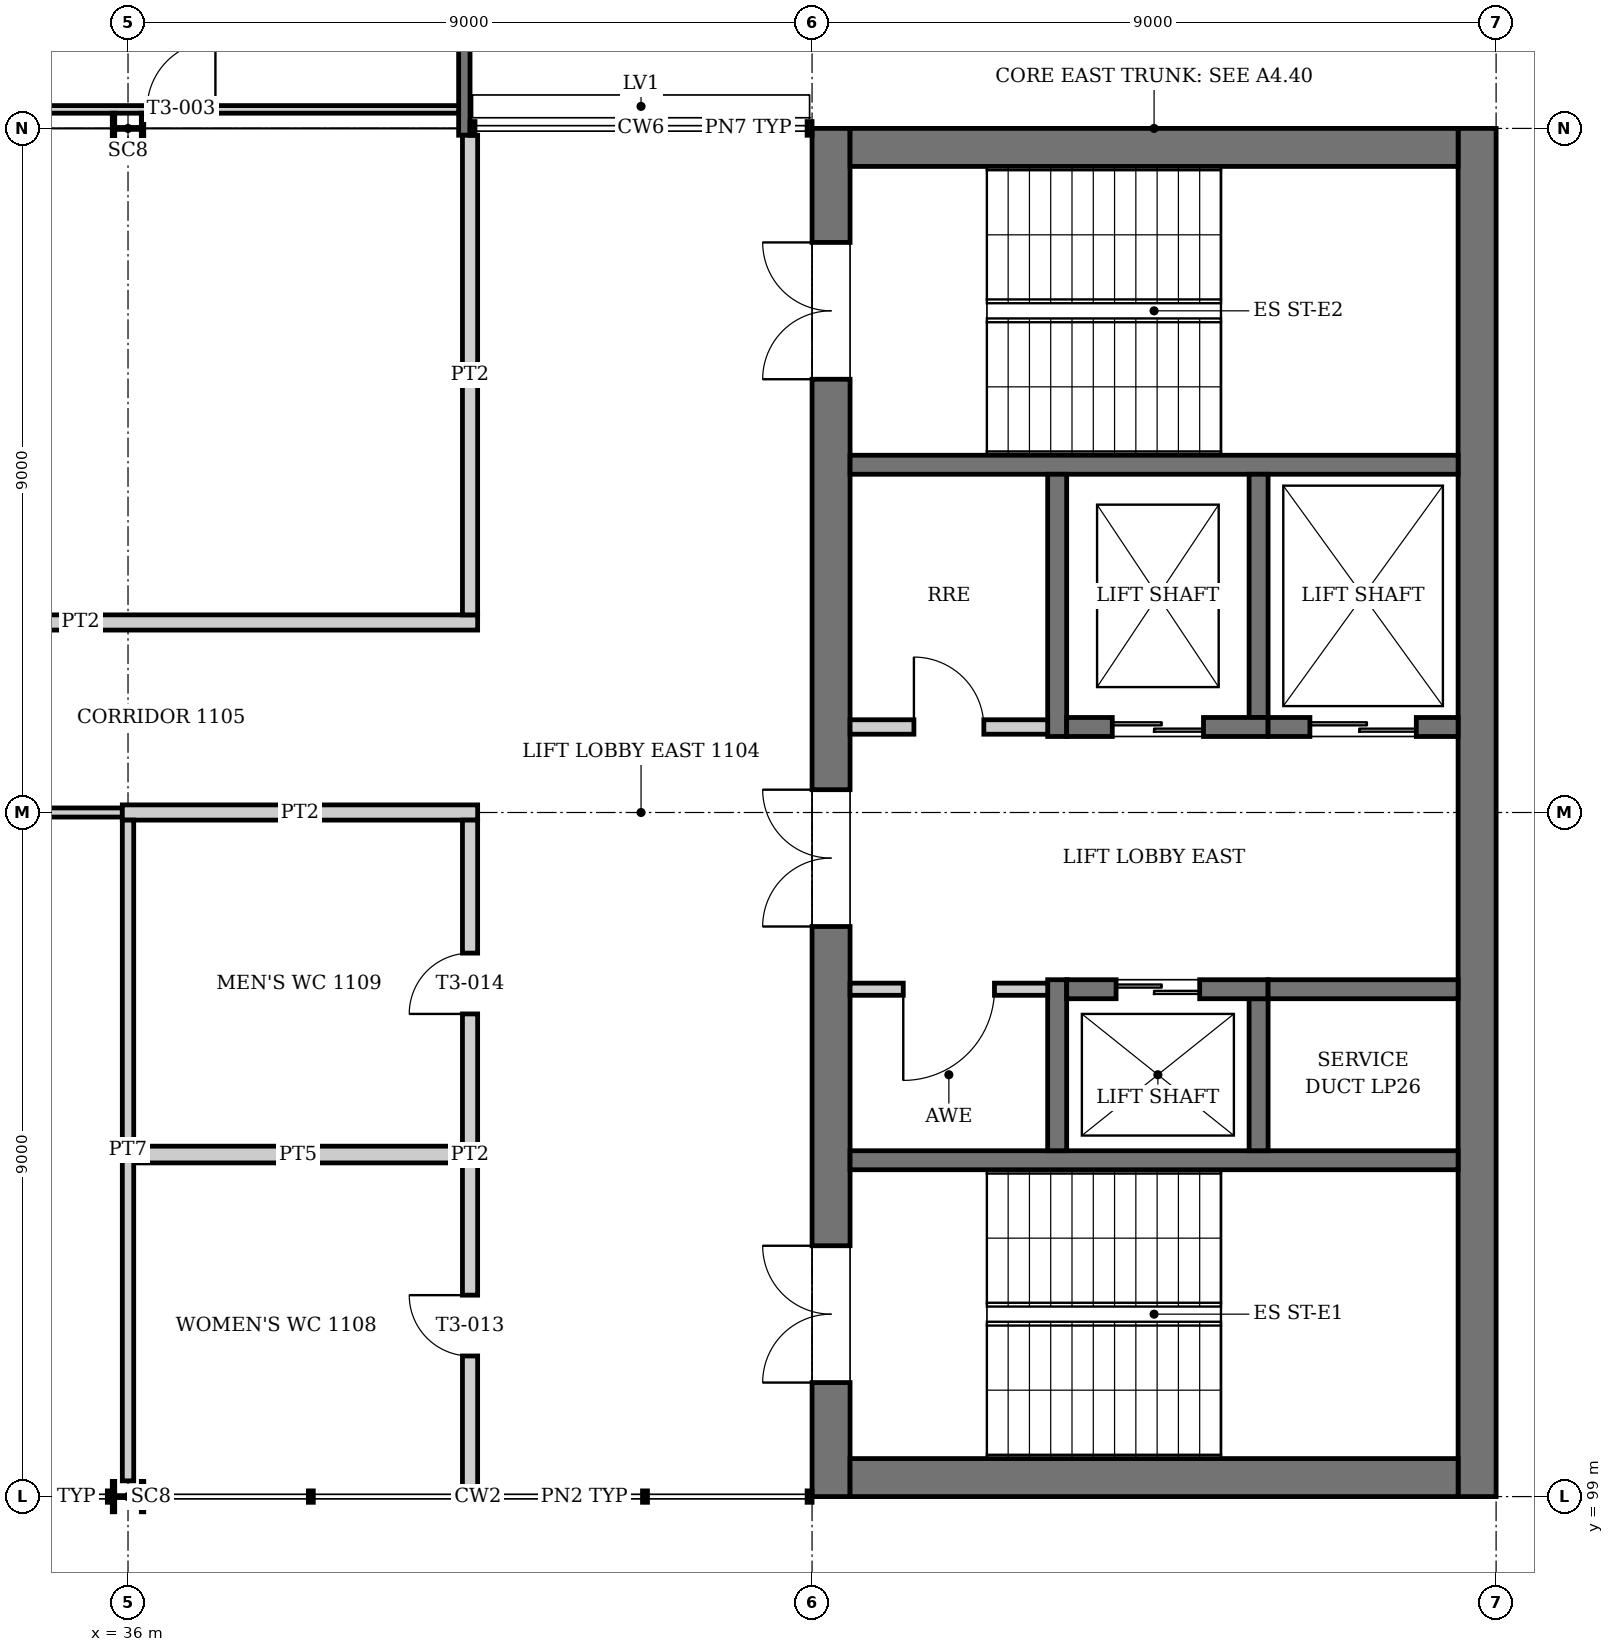
"""IFC4 building model, lengths in metres.
Left out: names, types, materials, properties, quantities, classifications, styles, units other than length and angle.
Written with IfcOpenShell. Run it as: python <this file> out.ifc"""

import sys

from ifc_helpers import new_model, si_unit, direction, frame, frame_2d, origin, origin_2d, place, context, subcontext, project, spatial, rectangle, i_section, extrude, element, fill, save


model = new_model("IFC4")
c1 = context("Model", 3, precision=1e-05, world=origin(), true_north=direction((0.0, 1.0)))
c2 = subcontext(c1, "Body", "Model", "MODEL_VIEW")
j1 = project(units=[si_unit("LENGTHUNIT", "METRE"), si_unit("PLANEANGLEUNIT", "RADIAN")], contexts=[c1])
p1 = place(None, origin())
s1 = spatial("IfcSite", under=j1, at=p1, CompositionType="ELEMENT")
p2 = place(p1, origin())
s2 = spatial("IfcBuilding", under=s1, at=p2, CompositionType="ELEMENT")
p3 = place(p2, frame((0.0, 0.0, 47.2)))
s3 = spatial("IfcBuildingStorey", under=s2, at=p3, CompositionType="ELEMENT", Elevation=47.2)
for number, where, z_axis, x_axis in (
    (1, (36.0, 99.0, 0.0), (0.0, 0.0, 1.0), (0.0, 1.0, 0.0)),
    (2, (36.0, 117.0, 0.0), (0.0, 0.0, 1.0), (0.0, 1.0, 0.0)),
):
    element("IfcColumn", number, at=place(p3, frame(where, z_axis=z_axis, x_axis=x_axis)), inside=s3, PredefinedType="COLUMN", context=c2, shape_type="SweptSolid", body=[
        extrude(i_section(OverallWidth=0.4, OverallDepth=0.414, WebThickness=0.025, FlangeThickness=0.032, at=origin_2d()), origin(), (0.0, 0.0, 1.0), 4.0),
    ])
p4 = place(p3, frame((45.25, 99.0, 0.0), z_axis=(0.0, 0.0, 1.0), x_axis=(0.0, 1.0, 0.0)))
e3 = element("IfcWall", 3, at=p4, inside=s3, PredefinedType="SHEAR", context=c2, shape_type="SweptSolid", body=[
    extrude(rectangle(XDim=18.0, YDim=0.5, at=frame_2d((9.0, 0.0))), origin(), (0.0, 0.0, 1.0), 4.0),
])
p5 = place(p4, frame((1.5, 0.0, 0.0)))
e4 = element("IfcOpeningElement", 4, at=p5, cuts=e3, PredefinedType="OPENING", context=c2, shape_type="SweptSolid", body=[
    extrude(rectangle(XDim=1.8, YDim=2.1, at=frame_2d((0.9, 1.05))), frame((0.0, 0.26, 0.0), z_axis=(0.0, -1.0, 0.0), x_axis=(1.0, 0.0, 0.0)), (0.0, 0.0, 1.0), 0.52),
])
p6 = place(p4, frame((14.7, 0.0, 0.0)))
e5 = element("IfcOpeningElement", 5, at=p6, cuts=e3, PredefinedType="OPENING", context=c2, shape_type="SweptSolid", body=[
    extrude(rectangle(XDim=1.8, YDim=2.1, at=frame_2d((0.9, 1.05))), frame((0.0, 0.26, 0.0), z_axis=(0.0, -1.0, 0.0), x_axis=(1.0, 0.0, 0.0)), (0.0, 0.0, 1.0), 0.52),
])
p7 = place(p4, frame((7.5, 0.0, 0.0)))
e6 = element("IfcOpeningElement", 6, at=p7, cuts=e3, PredefinedType="OPENING", context=c2, shape_type="SweptSolid", body=[
    extrude(rectangle(XDim=1.8, YDim=2.1, at=frame_2d((0.9, 1.05))), frame((0.0, 0.26, 0.0), z_axis=(0.0, -1.0, 0.0), x_axis=(1.0, 0.0, 0.0)), (0.0, 0.0, 1.0), 0.52),
])
p8 = place(p3, frame((53.75, 99.0, 0.0), z_axis=(0.0, 0.0, 1.0), x_axis=(0.0, 1.0, 0.0)))
e7 = element("IfcWall", 7, at=p8, inside=s3, PredefinedType="SHEAR", context=c2, shape_type="SweptSolid", body=[
    extrude(rectangle(XDim=18.0, YDim=0.5, at=frame_2d((9.0, 0.0))), origin(), (0.0, 0.0, 1.0), 4.0),
])
for number, where, z_axis, x_axis in (
    (8, (45.5, 99.25, 0.0), (0.0, 0.0, 1.0), (1.0, 0.0, 0.0)),
    (9, (45.5, 116.75, 0.0), (0.0, 0.0, 1.0), (1.0, 0.0, 0.0)),
):
    element("IfcWall", number, at=place(p3, frame(where, z_axis=z_axis, x_axis=x_axis)), inside=s3, PredefinedType="SHEAR", context=c2, shape_type="SweptSolid", body=[
        extrude(rectangle(XDim=8.0, YDim=0.5, at=frame_2d((4.0, 0.0))), origin(), (0.0, 0.0, 1.0), 4.0),
    ])
p9 = place(p3, frame((40.425, 120.45, -0.15), z_axis=(0.0, 0.0, 1.0), x_axis=(0.0, -1.0, 0.0)))
e10 = element("IfcWall", 10, at=p9, inside=s3, PredefinedType="SOLIDWALL", context=c2, shape_type="SweptSolid", body=[
    extrude(rectangle(XDim=3.54, YDim=0.15, at=frame_2d((1.77, 0.0))), origin(), (0.0, 0.0, 1.0), 2.75),
])
p10 = place(p3, frame((31.65, 117.25, 0.0), z_axis=(0.0, 0.0, 1.0), x_axis=(1.0, 0.0, 0.0)))
e11 = element("IfcWall", 11, at=p10, inside=s3, PredefinedType="PARTITIONING", context=c2, shape_type="SweptSolid", body=[
    extrude(rectangle(XDim=8.7, YDim=0.1, at=frame_2d((4.35, 0.0))), origin(), (0.0, 0.0, 1.0), 2.6),
])
p11 = place(p10, frame((4.6, 0.0, 0.0)))
e12 = element("IfcOpeningElement", 12, at=p11, cuts=e11, PredefinedType="OPENING", context=c2, shape_type="SweptSolid", body=[
    extrude(rectangle(XDim=0.9, YDim=2.1, at=frame_2d((0.45, 1.05))), frame((0.0, 0.06, 0.0), z_axis=(0.0, -1.0, 0.0), x_axis=(1.0, 0.0, 0.0)), (0.0, 0.0, 1.0), 0.12),
])
for number, where, z_axis, x_axis in (
    (13, (45.5, 103.425, 0.0), (0.0, 0.0, 1.0), (1.0, 0.0, 0.0)),
    (14, (45.5, 112.575, 0.0), (0.0, 0.0, 1.0), (1.0, 0.0, 0.0)),
):
    element("IfcWall", number, at=place(p3, frame(where, z_axis=z_axis, x_axis=x_axis)), inside=s3, PredefinedType="SOLIDWALL", context=c2, shape_type="SweptSolid", body=[
        extrude(rectangle(XDim=8.0, YDim=0.25, at=frame_2d((4.0, 0.0))), origin(), (0.0, 0.0, 1.0), 3.75),
    ])
p12 = place(p3, frame((48.225, 103.55, 0.0), z_axis=(0.0, 0.0, 1.0), x_axis=(0.0, 1.0, 0.0)))
e15 = element("IfcWall", 15, at=p12, inside=s3, PredefinedType="SOLIDWALL", context=c2, shape_type="SweptSolid", body=[
    extrude(rectangle(XDim=2.25, YDim=0.25, at=frame_2d((1.125, 0.0))), origin(), (0.0, 0.0, 1.0), 4.0),
])
p13 = place(p3, frame((50.875, 103.55, 0.0), z_axis=(0.0, 0.0, 1.0), x_axis=(0.0, 1.0, 0.0)))
e16 = element("IfcWall", 16, at=p13, inside=s3, PredefinedType="SOLIDWALL", context=c2, shape_type="SweptSolid", body=[
    extrude(rectangle(XDim=2.0, YDim=0.25, at=frame_2d((1.0, 0.0))), origin(), (0.0, 0.0, 1.0), 4.0),
])
p14 = place(p3, frame((48.35, 105.675, 0.0), z_axis=(0.0, 0.0, 1.0), x_axis=(1.0, 0.0, 0.0)))
e17 = element("IfcWall", 17, at=p14, inside=s3, PredefinedType="SOLIDWALL", context=c2, shape_type="SweptSolid", body=[
    extrude(rectangle(XDim=2.65, YDim=0.25, at=frame_2d((1.325, 0.0))), origin(), (0.0, 0.0, 1.0), 4.0),
])
p15 = place(p14, frame((0.65, 0.0, 0.0)))
e18 = element("IfcOpeningElement", 18, at=p15, cuts=e17, PredefinedType="OPENING", context=c2, shape_type="SweptSolid", body=[
    extrude(rectangle(XDim=1.1, YDim=2.1, at=frame_2d((0.55, 1.05))), frame((0.0, 0.135, 0.0), z_axis=(0.0, -1.0, 0.0), x_axis=(1.0, 0.0, 0.0)), (0.0, 0.0, 1.0), 0.27),
])
p16 = place(p3, frame((51.0, 105.675, 0.0), z_axis=(0.0, 0.0, 1.0), x_axis=(1.0, 0.0, 0.0)))
e19 = element("IfcWall", 19, at=p16, inside=s3, PredefinedType="SOLIDWALL", context=c2, shape_type="SweptSolid", body=[
    extrude(rectangle(XDim=2.5, YDim=0.25, at=frame_2d((1.25, 0.0))), origin(), (0.0, 0.0, 1.0), 4.0),
])
p17 = place(p3, frame((48.225, 109.0, 0.0), z_axis=(0.0, 0.0, 1.0), x_axis=(0.0, 1.0, 0.0)))
e20 = element("IfcWall", 20, at=p17, inside=s3, PredefinedType="SOLIDWALL", context=c2, shape_type="SweptSolid", body=[
    extrude(rectangle(XDim=3.45, YDim=0.25, at=frame_2d((1.725, 0.0))), origin(), (0.0, 0.0, 1.0), 4.0),
])
p18 = place(p3, frame((50.875, 109.25, 0.0), z_axis=(0.0, 0.0, 1.0), x_axis=(0.0, 1.0, 0.0)))
e21 = element("IfcWall", 21, at=p18, inside=s3, PredefinedType="SOLIDWALL", context=c2, shape_type="SweptSolid", body=[
    extrude(rectangle(XDim=3.2, YDim=0.25, at=frame_2d((1.6, 0.0))), origin(), (0.0, 0.0, 1.0), 4.0),
])
p19 = place(p3, frame((48.35, 109.125, 0.0), z_axis=(0.0, 0.0, 1.0), x_axis=(1.0, 0.0, 0.0)))
e22 = element("IfcWall", 22, at=p19, inside=s3, PredefinedType="SOLIDWALL", context=c2, shape_type="SweptSolid", body=[
    extrude(rectangle(XDim=2.65, YDim=0.25, at=frame_2d((1.325, 0.0))), origin(), (0.0, 0.0, 1.0), 4.0),
])
p20 = place(p19, frame((0.6, 0.0, 0.0)))
e23 = element("IfcOpeningElement", 23, at=p20, cuts=e22, PredefinedType="OPENING", context=c2, shape_type="SweptSolid", body=[
    extrude(rectangle(XDim=1.2, YDim=2.1, at=frame_2d((0.6, 1.05))), frame((0.0, 0.135, 0.0), z_axis=(0.0, -1.0, 0.0), x_axis=(1.0, 0.0, 0.0)), (0.0, 0.0, 1.0), 0.27),
])
p21 = place(p3, frame((51.0, 109.125, 0.0), z_axis=(0.0, 0.0, 1.0), x_axis=(1.0, 0.0, 0.0)))
e24 = element("IfcWall", 24, at=p21, inside=s3, PredefinedType="SOLIDWALL", context=c2, shape_type="SweptSolid", body=[
    extrude(rectangle(XDim=2.5, YDim=0.25, at=frame_2d((1.25, 0.0))), origin(), (0.0, 0.0, 1.0), 4.0),
])
p22 = place(p21, frame((0.55, 0.0, 0.0)))
e25 = element("IfcOpeningElement", 25, at=p22, cuts=e24, PredefinedType="OPENING", context=c2, shape_type="SweptSolid", body=[
    extrude(rectangle(XDim=1.4, YDim=2.4, at=frame_2d((0.7, 1.2))), frame((0.0, 0.135, 0.0), z_axis=(0.0, -1.0, 0.0), x_axis=(1.0, 0.0, 0.0)), (0.0, 0.0, 1.0), 0.27),
])
p23 = place(p3, frame((45.5, 105.675, 0.0), z_axis=(0.0, 0.0, 1.0), x_axis=(1.0, 0.0, 0.0)))
e26 = element("IfcWall", 26, at=p23, inside=s3, PredefinedType="PARTITIONING", context=c2, shape_type="SweptSolid", body=[
    extrude(rectangle(XDim=2.6, YDim=0.16, at=frame_2d((1.3, 0.0))), origin(), (0.0, 0.0, 1.0), 3.75),
])
p24 = place(p23, frame((0.7, 0.0, 0.0)))
e27 = element("IfcOpeningElement", 27, at=p24, cuts=e26, PredefinedType="OPENING", context=c2, shape_type="SweptSolid", body=[
    extrude(rectangle(XDim=1.2, YDim=2.1, at=frame_2d((0.6, 1.05))), frame((0.0, 0.09, 0.0), z_axis=(0.0, -1.0, 0.0), x_axis=(1.0, 0.0, 0.0)), (0.0, 0.0, 1.0), 0.18),
])
p25 = place(p3, frame((45.5, 109.125, 0.0), z_axis=(0.0, 0.0, 1.0), x_axis=(1.0, 0.0, 0.0)))
e28 = element("IfcWall", 28, at=p25, inside=s3, PredefinedType="PARTITIONING", context=c2, shape_type="SweptSolid", body=[
    extrude(rectangle(XDim=2.6, YDim=0.19, at=frame_2d((1.3, 0.0))), origin(), (0.0, 0.0, 1.0), 3.75),
])
p26 = place(p25, frame((0.84, 0.0, 0.0)))
e29 = element("IfcOpeningElement", 29, at=p26, cuts=e28, PredefinedType="OPENING", context=c2, shape_type="SweptSolid", body=[
    extrude(rectangle(XDim=0.92, YDim=2.1, at=frame_2d((0.46, 1.05))), frame((0.0, 0.105, 0.0), z_axis=(0.0, -1.0, 0.0), x_axis=(1.0, 0.0, 0.0)), (0.0, 0.0, 1.0), 0.21),
])
p27 = place(p3, frame((36.075, 103.5, 0.0), z_axis=(0.0, 0.0, 1.0), x_axis=(1.0, 0.0, 0.0)))
e30 = element("IfcWall", 30, at=p27, inside=s3, PredefinedType="PLUMBINGWALL", context=c2, shape_type="SweptSolid", body=[
    extrude(rectangle(XDim=4.325, YDim=0.22, at=frame_2d((2.163, 0.0))), origin(), (0.0, 0.0, 1.0), 3.05),
])
p28 = place(p3, frame((17.94, 108.0, 0.0), z_axis=(0.0, 0.0, 1.0), x_axis=(1.0, 0.0, 0.0)))
e31 = element("IfcWall", 31, at=p28, inside=s3, PredefinedType="PARTITIONING", context=c2, shape_type="SweptSolid", body=[
    extrude(rectangle(XDim=17.985, YDim=0.12, at=frame_2d((8.993, 0.0))), origin(), (0.0, 0.0, 1.0), 3.05),
])
p29 = place(p28, frame((3.66, 0.0, 0.0)))
e32 = element("IfcOpeningElement", 32, at=p29, cuts=e31, PredefinedType="OPENING", context=c2, shape_type="SweptSolid", body=[
    extrude(rectangle(XDim=1.8, YDim=2.1, at=frame_2d((0.9, 1.05))), frame((0.0, 0.07, 0.0), z_axis=(0.0, -1.0, 0.0), x_axis=(1.0, 0.0, 0.0)), (0.0, 0.0, 1.0), 0.14),
])
p30 = place(p28, frame((12.66, 0.0, 0.0)))
e33 = element("IfcOpeningElement", 33, at=p30, cuts=e31, PredefinedType="OPENING", context=c2, shape_type="SweptSolid", body=[
    extrude(rectangle(XDim=1.8, YDim=2.1, at=frame_2d((0.9, 1.05))), frame((0.0, 0.07, 0.0), z_axis=(0.0, -1.0, 0.0), x_axis=(1.0, 0.0, 0.0)), (0.0, 0.0, 1.0), 0.14),
])
p31 = place(p3, frame((35.925, 108.0, 0.0), z_axis=(0.0, 0.0, 1.0), x_axis=(1.0, 0.0, 0.0)))
e34 = element("IfcWall", 34, at=p31, inside=s3, PredefinedType="PARTITIONING", context=c2, shape_type="SweptSolid", body=[
    extrude(rectangle(XDim=4.675, YDim=0.2, at=frame_2d((2.337, 0.0))), origin(), (0.0, 0.0, 1.0), 3.05),
])
p32 = place(p3, frame((17.9, 110.5, 0.0), z_axis=(0.0, 0.0, 1.0), x_axis=(1.0, 0.0, 0.0)))
e35 = element("IfcWall", 35, at=p32, inside=s3, PredefinedType="PARTITIONING", context=c2, shape_type="SweptSolid", body=[
    extrude(rectangle(XDim=22.7, YDim=0.2, at=frame_2d((11.35, 0.0))), origin(), (0.0, 0.0, 1.0), 3.05),
])
p33 = place(p32, frame((10.45, 0.0, 0.0)))
e36 = element("IfcOpeningElement", 36, at=p33, cuts=e35, PredefinedType="OPENING", context=c2, shape_type="SweptSolid", body=[
    extrude(rectangle(XDim=1.8, YDim=2.1, at=frame_2d((0.9, 1.05))), frame((0.0, 0.11, 0.0), z_axis=(0.0, -1.0, 0.0), x_axis=(1.0, 0.0, 0.0)), (0.0, 0.0, 1.0), 0.22),
])
p34 = place(p3, frame((36.0, 99.207, 0.0), z_axis=(0.0, 0.0, 1.0), x_axis=(0.0, 1.0, 0.0)))
e37 = element("IfcWall", 37, at=p34, inside=s3, PredefinedType="PARTITIONING", context=c2, shape_type="SweptSolid", body=[
    extrude(rectangle(XDim=8.693, YDim=0.15, at=frame_2d((4.346, 0.0))), origin(), (0.0, 0.0, 1.0), 3.05),
])
p35 = place(p3, frame((40.5, 99.075, 0.0), z_axis=(0.0, 0.0, 1.0), x_axis=(0.0, 1.0, 0.0)))
e38 = element("IfcWall", 38, at=p35, inside=s3, PredefinedType="PARTITIONING", context=c2, shape_type="SweptSolid", body=[
    extrude(rectangle(XDim=8.825, YDim=0.2, at=frame_2d((4.413, 0.0))), origin(), (0.0, 0.0, 1.0), 3.05),
])
p36 = place(p35, frame((1.775, 0.0, 0.0)))
e39 = element("IfcOpeningElement", 39, at=p36, cuts=e38, PredefinedType="OPENING", context=c2, shape_type="SweptSolid", body=[
    extrude(rectangle(XDim=0.8, YDim=2.1, at=frame_2d((0.4, 1.05))), frame((0.0, 0.11, 0.0), z_axis=(0.0, -1.0, 0.0), x_axis=(1.0, 0.0, 0.0)), (0.0, 0.0, 1.0), 0.22),
])
p37 = place(p35, frame((6.275, 0.0, 0.0)))
e40 = element("IfcOpeningElement", 40, at=p37, cuts=e38, PredefinedType="OPENING", context=c2, shape_type="SweptSolid", body=[
    extrude(rectangle(XDim=0.8, YDim=2.1, at=frame_2d((0.4, 1.05))), frame((0.0, 0.11, 0.0), z_axis=(0.0, -1.0, 0.0), x_axis=(1.0, 0.0, 0.0)), (0.0, 0.0, 1.0), 0.22),
])
p38 = place(p3, frame((40.5, 110.6, 0.0), z_axis=(0.0, 0.0, 1.0), x_axis=(0.0, 1.0, 0.0)))
e41 = element("IfcWall", 41, at=p38, inside=s3, PredefinedType="PARTITIONING", context=c2, shape_type="SweptSolid", body=[
    extrude(rectangle(XDim=6.31, YDim=0.2, at=frame_2d((3.155, 0.0))), origin(), (0.0, 0.0, 1.0), 3.05),
])
p39 = place(p11, origin())
e42 = element("IfcDoor", 42, at=p39, inside=s3, OperationType="SINGLE_SWING_RIGHT", PredefinedType="DOOR", context=c2, shape_type="SweptSolid", body=[
    extrude(rectangle(XDim=0.9, YDim=2.1, at=frame_2d((0.45, 1.05))), frame((0.0, 0.025, 0.0), z_axis=(0.0, -1.0, 0.0), x_axis=(1.0, 0.0, 0.0)), (0.0, 0.0, 1.0), 0.05),
])
fill(e12, e42)
p40 = place(p15, origin())
e43 = element("IfcDoor", 43, at=p40, inside=s3, OperationType="DOUBLE_DOOR_SLIDING", PredefinedType="DOOR", context=c2, shape_type="SweptSolid", body=[
    extrude(rectangle(XDim=1.1, YDim=2.1, at=frame_2d((0.55, 1.05))), frame((0.0, 0.025, 0.0), z_axis=(0.0, -1.0, 0.0), x_axis=(1.0, 0.0, 0.0)), (0.0, 0.0, 1.0), 0.05),
])
fill(e18, e43)
p41 = place(p20, origin())
e44 = element("IfcDoor", 44, at=p41, inside=s3, OperationType="DOUBLE_DOOR_SLIDING", PredefinedType="DOOR", context=c2, shape_type="SweptSolid", body=[
    extrude(rectangle(XDim=1.2, YDim=2.1, at=frame_2d((0.6, 1.05))), frame((0.0, 0.025, 0.0), z_axis=(0.0, -1.0, 0.0), x_axis=(1.0, 0.0, 0.0)), (0.0, 0.0, 1.0), 0.05),
])
fill(e23, e44)
p42 = place(p22, origin())
e45 = element("IfcDoor", 45, at=p42, inside=s3, OperationType="DOUBLE_DOOR_SLIDING", PredefinedType="DOOR", context=c2, shape_type="SweptSolid", body=[
    extrude(rectangle(XDim=1.4, YDim=2.4, at=frame_2d((0.7, 1.2))), frame((0.0, 0.025, 0.0), z_axis=(0.0, -1.0, 0.0), x_axis=(1.0, 0.0, 0.0)), (0.0, 0.0, 1.0), 0.05),
])
fill(e25, e45)
p43 = place(p36, origin())
e46 = element("IfcDoor", 46, at=p43, inside=s3, OperationType="SINGLE_SWING_RIGHT", PredefinedType="DOOR", context=c2, shape_type="SweptSolid", body=[
    extrude(rectangle(XDim=0.8, YDim=2.1, at=frame_2d((0.4, 1.05))), frame((0.0, 0.025, 0.0), z_axis=(0.0, -1.0, 0.0), x_axis=(1.0, 0.0, 0.0)), (0.0, 0.0, 1.0), 0.05),
])
fill(e39, e46)
p44 = place(p37, origin())
e47 = element("IfcDoor", 47, at=p44, inside=s3, OperationType="SINGLE_SWING_LEFT", PredefinedType="DOOR", context=c2, shape_type="SweptSolid", body=[
    extrude(rectangle(XDim=0.8, YDim=2.1, at=frame_2d((0.4, 1.05))), frame((0.0, 0.025, 0.0), z_axis=(0.0, -1.0, 0.0), x_axis=(1.0, 0.0, 0.0)), (0.0, 0.0, 1.0), 0.05),
])
fill(e40, e47)
p45 = place(p5, origin())
e48 = element("IfcDoor", 48, at=p45, inside=s3, OperationType="DOUBLE_DOOR_SINGLE_SWING", PredefinedType="DOOR", context=c2, shape_type="SweptSolid", body=[
    extrude(rectangle(XDim=1.8, YDim=2.1, at=frame_2d((0.9, 1.05))), frame((0.0, 0.025, 0.0), z_axis=(0.0, -1.0, 0.0), x_axis=(1.0, 0.0, 0.0)), (0.0, 0.0, 1.0), 0.05),
])
fill(e4, e48)
p46 = place(p6, origin())
e49 = element("IfcDoor", 49, at=p46, inside=s3, OperationType="DOUBLE_DOOR_SINGLE_SWING", PredefinedType="DOOR", context=c2, shape_type="SweptSolid", body=[
    extrude(rectangle(XDim=1.8, YDim=2.1, at=frame_2d((0.9, 1.05))), frame((0.0, 0.025, 0.0), z_axis=(0.0, -1.0, 0.0), x_axis=(1.0, 0.0, 0.0)), (0.0, 0.0, 1.0), 0.05),
])
fill(e5, e49)
p47 = place(p7, origin())
e50 = element("IfcDoor", 50, at=p47, inside=s3, OperationType="DOUBLE_DOOR_SINGLE_SWING", PredefinedType="DOOR", context=c2, shape_type="SweptSolid", body=[
    extrude(rectangle(XDim=1.8, YDim=2.1, at=frame_2d((0.9, 1.05))), frame((0.0, 0.025, 0.0), z_axis=(0.0, -1.0, 0.0), x_axis=(1.0, 0.0, 0.0)), (0.0, 0.0, 1.0), 0.05),
])
fill(e6, e50)
p48 = place(p24, frame((1.2, 0.0, 0.0), z_axis=(0.0, 0.0, 1.0), x_axis=(-1.0, 0.0, 0.0)))
e51 = element("IfcDoor", 51, at=p48, inside=s3, OperationType="SINGLE_SWING_RIGHT", PredefinedType="DOOR", context=c2, shape_type="SweptSolid", body=[
    extrude(rectangle(XDim=1.2, YDim=2.1, at=frame_2d((0.6, 1.05))), frame((0.0, 0.025, 0.0), z_axis=(0.0, -1.0, 0.0), x_axis=(1.0, 0.0, 0.0)), (0.0, 0.0, 1.0), 0.05),
])
fill(e27, e51)
p49 = place(p26, origin())
e52 = element("IfcDoor", 52, at=p49, inside=s3, OperationType="SINGLE_SWING_LEFT", PredefinedType="DOOR", context=c2, shape_type="SweptSolid", body=[
    extrude(rectangle(XDim=0.92, YDim=2.1, at=frame_2d((0.46, 1.05))), frame((0.0, 0.025, 0.0), z_axis=(0.0, -1.0, 0.0), x_axis=(1.0, 0.0, 0.0)), (0.0, 0.0, 1.0), 0.05),
])
fill(e29, e52)
save(model, sys.argv[1])
